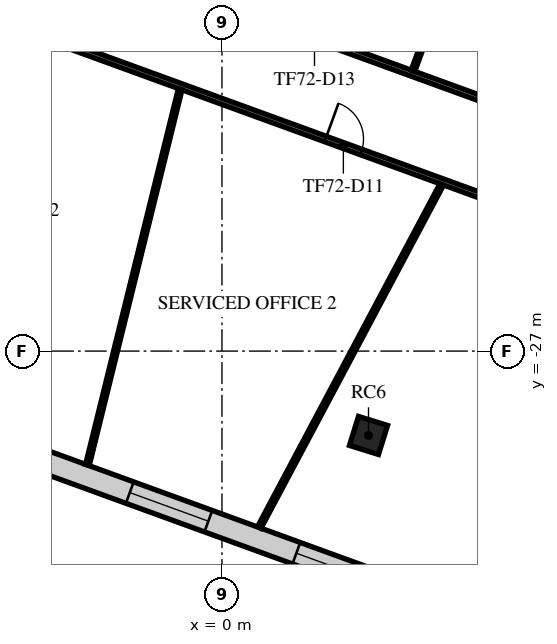
"""IFC4 building model, lengths in metres.
Left out: names, types, materials, properties, quantities, classifications, styles, units other than length and angle.
Written with IfcOpenShell. Run it as: python <this file> out.ifc"""

import sys

from ifc_helpers import new_model, si_unit, direction, frame, frame_2d, origin, origin_2d, place, context, subcontext, project, spatial, rectangle, extrude, element, fill, save


model = new_model("IFC4")
c1 = context("Model", 3, precision=1e-05, world=origin(), true_north=direction((0.0, 1.0)))
c2 = subcontext(c1, "Body", "Model", "MODEL_VIEW")
j1 = project(units=[si_unit("LENGTHUNIT", "METRE"), si_unit("PLANEANGLEUNIT", "RADIAN")], contexts=[c1])
p1 = place(None, origin())
s1 = spatial("IfcSite", under=j1, at=p1, CompositionType="ELEMENT")
p2 = place(p1, origin())
s2 = spatial("IfcBuilding", under=s1, at=p2, CompositionType="ELEMENT")
p3 = place(p2, frame((0.0, 0.0, 304.5)))
s3 = spatial("IfcBuildingStorey", under=s2, at=p3, CompositionType="ELEMENT", Elevation=304.5)
p4 = place(p3, frame((3.856, -29.22, 0.0), z_axis=(0.0, 0.0, 1.0), x_axis=(0.297503182032, 0.954720826567, 0.0)))
e1 = element("IfcColumn", 1, at=p4, inside=s3, PredefinedType="COLUMN", context=c2, shape_type="SweptSolid", body=[
    extrude(rectangle(XDim=0.8, YDim=0.8, at=origin_2d()), origin(), (0.0, 0.0, 1.0), 4.0),
])
p5 = place(p3, frame((-29.882, -20.73, 0.0), z_axis=(0.0, 0.0, 1.0), x_axis=(0.939693709578, -0.34201715188, 0.0)))
e2 = element("IfcWall", 2, at=p5, inside=s3, PredefinedType="STANDARD", context=c2, shape_type="SweptSolid", body=[
    extrude(rectangle(XDim=41.979, YDim=0.6, at=frame_2d((20.99, 0.0))), origin(), (0.0, 0.0, 1.0), 3.65),
])
p6 = place(p5, frame((1.232, 0.0, 0.9)))
e3 = element("IfcOpeningElement", 3, at=p6, cuts=e2, PredefinedType="OPENING", context=c2, shape_type="SweptSolid", body=[
    extrude(rectangle(XDim=2.2, YDim=2.1, at=frame_2d((1.1, 1.05))), frame((0.0, 0.31, 0.0), z_axis=(0.0, -1.0, 0.0), x_axis=(1.0, 0.0, 0.0)), (0.0, 0.0, 1.0), 0.62),
])
p7 = place(p5, frame((5.896, 0.0, 0.9)))
e4 = element("IfcOpeningElement", 4, at=p7, cuts=e2, PredefinedType="OPENING", context=c2, shape_type="SweptSolid", body=[
    extrude(rectangle(XDim=2.2, YDim=2.1, at=frame_2d((1.1, 1.05))), frame((0.0, 0.31, 0.0), z_axis=(0.0, -1.0, 0.0), x_axis=(1.0, 0.0, 0.0)), (0.0, 0.0, 1.0), 0.62),
])
p8 = place(p5, frame((10.561, 0.0, 0.9)))
e5 = element("IfcOpeningElement", 5, at=p8, cuts=e2, PredefinedType="OPENING", context=c2, shape_type="SweptSolid", body=[
    extrude(rectangle(XDim=2.2, YDim=2.1, at=frame_2d((1.1, 1.05))), frame((0.0, 0.31, 0.0), z_axis=(0.0, -1.0, 0.0), x_axis=(1.0, 0.0, 0.0)), (0.0, 0.0, 1.0), 0.62),
])
p9 = place(p5, frame((15.225, 0.0, 0.9)))
e6 = element("IfcOpeningElement", 6, at=p9, cuts=e2, PredefinedType="OPENING", context=c2, shape_type="SweptSolid", body=[
    extrude(rectangle(XDim=2.2, YDim=2.1, at=frame_2d((1.1, 1.05))), frame((0.0, 0.31, 0.0), z_axis=(0.0, -1.0, 0.0), x_axis=(1.0, 0.0, 0.0)), (0.0, 0.0, 1.0), 0.62),
])
p10 = place(p5, frame((19.89, 0.0, 0.9)))
e7 = element("IfcOpeningElement", 7, at=p10, cuts=e2, PredefinedType="OPENING", context=c2, shape_type="SweptSolid", body=[
    extrude(rectangle(XDim=2.2, YDim=2.1, at=frame_2d((1.1, 1.05))), frame((0.0, 0.31, 0.0), z_axis=(0.0, -1.0, 0.0), x_axis=(1.0, 0.0, 0.0)), (0.0, 0.0, 1.0), 0.62),
])
p11 = place(p5, frame((24.554, 0.0, 0.9)))
e8 = element("IfcOpeningElement", 8, at=p11, cuts=e2, PredefinedType="OPENING", context=c2, shape_type="SweptSolid", body=[
    extrude(rectangle(XDim=2.2, YDim=2.1, at=frame_2d((1.1, 1.05))), frame((0.0, 0.31, 0.0), z_axis=(0.0, -1.0, 0.0), x_axis=(1.0, 0.0, 0.0)), (0.0, 0.0, 1.0), 0.62),
])
p12 = place(p5, frame((29.218, 0.0, 0.9)))
e9 = element("IfcOpeningElement", 9, at=p12, cuts=e2, PredefinedType="OPENING", context=c2, shape_type="SweptSolid", body=[
    extrude(rectangle(XDim=2.2, YDim=2.1, at=frame_2d((1.1, 1.05))), frame((0.0, 0.31, 0.0), z_axis=(0.0, -1.0, 0.0), x_axis=(1.0, 0.0, 0.0)), (0.0, 0.0, 1.0), 0.62),
])
p13 = place(p5, frame((33.883, 0.0, 0.9)))
e10 = element("IfcOpeningElement", 10, at=p13, cuts=e2, PredefinedType="OPENING", context=c2, shape_type="SweptSolid", body=[
    extrude(rectangle(XDim=2.2, YDim=2.1, at=frame_2d((1.1, 1.05))), frame((0.0, 0.31, 0.0), z_axis=(0.0, -1.0, 0.0), x_axis=(1.0, 0.0, 0.0)), (0.0, 0.0, 1.0), 0.62),
])
p14 = place(p5, frame((38.547, 0.0, 0.9)))
e11 = element("IfcOpeningElement", 11, at=p14, cuts=e2, PredefinedType="OPENING", context=c2, shape_type="SweptSolid", body=[
    extrude(rectangle(XDim=2.2, YDim=2.1, at=frame_2d((1.1, 1.05))), frame((0.0, 0.31, 0.0), z_axis=(0.0, -1.0, 0.0), x_axis=(1.0, 0.0, 0.0)), (0.0, 0.0, 1.0), 0.62),
])
p15 = place(p3, frame((-24.679, -11.445, 0.0), z_axis=(0.0, 0.0, 1.0), x_axis=(0.939685239834, -0.342040421645, 0.0)))
e12 = element("IfcWall", 12, at=p15, inside=s3, PredefinedType="PARTITIONING", context=c2, shape_type="SweptSolid", body=[
    extrude(rectangle(XDim=38.628, YDim=0.15, at=frame_2d((19.314, 0.0))), origin(), (0.0, 0.0, 1.0), 3.25),
])
p16 = place(p15, frame((8.764, 0.0, 0.0)))
e13 = element("IfcOpeningElement", 13, at=p16, cuts=e12, PredefinedType="OPENING", context=c2, shape_type="SweptSolid", body=[
    extrude(rectangle(XDim=1.0, YDim=2.1, at=frame_2d((0.5, 1.05))), frame((0.0, 0.085, 0.0), z_axis=(0.0, -1.0, 0.0), x_axis=(1.0, 0.0, 0.0)), (0.0, 0.0, 1.0), 0.17),
])
p17 = place(p15, frame((19.503, 0.0, 0.0)))
e14 = element("IfcOpeningElement", 14, at=p17, cuts=e12, PredefinedType="OPENING", context=c2, shape_type="SweptSolid", body=[
    extrude(rectangle(XDim=1.0, YDim=2.1, at=frame_2d((0.5, 1.05))), frame((0.0, 0.085, 0.0), z_axis=(0.0, -1.0, 0.0), x_axis=(1.0, 0.0, 0.0)), (0.0, 0.0, 1.0), 0.17),
])
p18 = place(p15, frame((29.163, 0.0, 0.0)))
e15 = element("IfcOpeningElement", 15, at=p18, cuts=e12, PredefinedType="OPENING", context=c2, shape_type="SweptSolid", body=[
    extrude(rectangle(XDim=1.0, YDim=2.1, at=frame_2d((0.5, 1.05))), frame((0.0, 0.085, 0.0), z_axis=(0.0, -1.0, 0.0), x_axis=(1.0, 0.0, 0.0)), (0.0, 0.0, 1.0), 0.17),
])
p19 = place(p3, frame((0.978, -18.23, 0.0), z_axis=(0.0, 0.0, 1.0), x_axis=(0.939684094149, -0.34204356916, 0.0)))
e16 = element("IfcWall", 16, at=p19, inside=s3, PredefinedType="PARTITIONING", context=c2, shape_type="SweptSolid", body=[
    extrude(rectangle(XDim=12.198, YDim=0.15, at=frame_2d((6.099, 0.0))), origin(), (0.0, 0.0, 1.0), 3.25),
])
p20 = place(p19, frame((1.05, 0.0, 0.0)))
e17 = element("IfcOpeningElement", 17, at=p20, cuts=e16, PredefinedType="OPENING", context=c2, shape_type="SweptSolid", body=[
    extrude(rectangle(XDim=1.0, YDim=2.1, at=frame_2d((0.5, 1.05))), frame((0.0, 0.085, 0.0), z_axis=(0.0, -1.0, 0.0), x_axis=(1.0, 0.0, 0.0)), (0.0, 0.0, 1.0), 0.17),
])
p21 = place(p19, frame((9.083, 0.0, 0.0)))
e18 = element("IfcOpeningElement", 18, at=p21, cuts=e16, PredefinedType="OPENING", context=c2, shape_type="SweptSolid", body=[
    extrude(rectangle(XDim=1.0, YDim=2.1, at=frame_2d((0.5, 1.05))), frame((0.0, 0.085, 0.0), z_axis=(0.0, -1.0, 0.0), x_axis=(1.0, 0.0, 0.0)), (0.0, 0.0, 1.0), 0.17),
])
p22 = place(p3, frame((-3.54, -29.996, 0.0), z_axis=(0.0, 0.0, 1.0), x_axis=(0.239628478721, 0.970864662137, 0.0)))
e19 = element("IfcWall", 19, at=p22, inside=s3, PredefinedType="PARTITIONING", context=c2, shape_type="SweptSolid", body=[
    extrude(rectangle(XDim=10.18, YDim=0.1, at=frame_2d((5.09, 0.0))), origin(), (0.0, 0.0, 1.0), 3.05),
])
p23 = place(p3, frame((0.982, -31.642, 0.0), z_axis=(0.0, 0.0, 1.0), x_axis=(0.469538881217, 0.882911795722, 0.0)))
e20 = element("IfcWall", 20, at=p23, inside=s3, PredefinedType="PARTITIONING", context=c2, shape_type="SweptSolid", body=[
    extrude(rectangle(XDim=10.219, YDim=0.1, at=frame_2d((5.11, 0.0))), origin(), (0.0, 0.0, 1.0), 3.05),
])
p24 = place(p3, frame((5.028, -19.624, 0.0), z_axis=(0.0, 0.0, 1.0), x_axis=(0.342064062603, 0.939676634314, 0.0)))
e21 = element("IfcWall", 21, at=p24, inside=s3, PredefinedType="PARTITIONING", context=c2, shape_type="SweptSolid", body=[
    extrude(rectangle(XDim=4.396, YDim=0.1, at=frame_2d((2.198, 0.0))), origin(), (0.0, 0.0, 1.0), 3.65),
])
p25 = place(p12, origin())
e22 = element("IfcWindow", 22, at=p25, inside=s3, PartitioningType="SINGLE_PANEL", PredefinedType="WINDOW", context=c2, shape_type="SweptSolid", body=[
    extrude(rectangle(XDim=2.2, YDim=2.1, at=frame_2d((1.1, 1.05))), frame((0.0, 0.03, 0.0), z_axis=(0.0, -1.0, 0.0), x_axis=(1.0, 0.0, 0.0)), (0.0, 0.0, 1.0), 0.06),
])
fill(e9, e22)
p26 = place(p13, origin())
e23 = element("IfcWindow", 23, at=p26, inside=s3, PartitioningType="SINGLE_PANEL", PredefinedType="WINDOW", context=c2, shape_type="SweptSolid", body=[
    extrude(rectangle(XDim=2.2, YDim=2.1, at=frame_2d((1.1, 1.05))), frame((0.0, 0.03, 0.0), z_axis=(0.0, -1.0, 0.0), x_axis=(1.0, 0.0, 0.0)), (0.0, 0.0, 1.0), 0.06),
])
fill(e10, e23)
p27 = place(p18, frame((1.0, 0.0, 0.0), z_axis=(0.0, 0.0, 1.0), x_axis=(-1.0, 0.0, 0.0)))
e24 = element("IfcDoor", 24, at=p27, inside=s3, OperationType="SINGLE_SWING_RIGHT", PredefinedType="DOOR", context=c2, shape_type="SweptSolid", body=[
    extrude(rectangle(XDim=1.0, YDim=2.1, at=frame_2d((0.5, 1.05))), frame((0.0, 0.025, 0.0), z_axis=(0.0, -1.0, 0.0), x_axis=(1.0, 0.0, 0.0)), (0.0, 0.0, 1.0), 0.05),
])
fill(e15, e24)
save(model, sys.argv[1])
